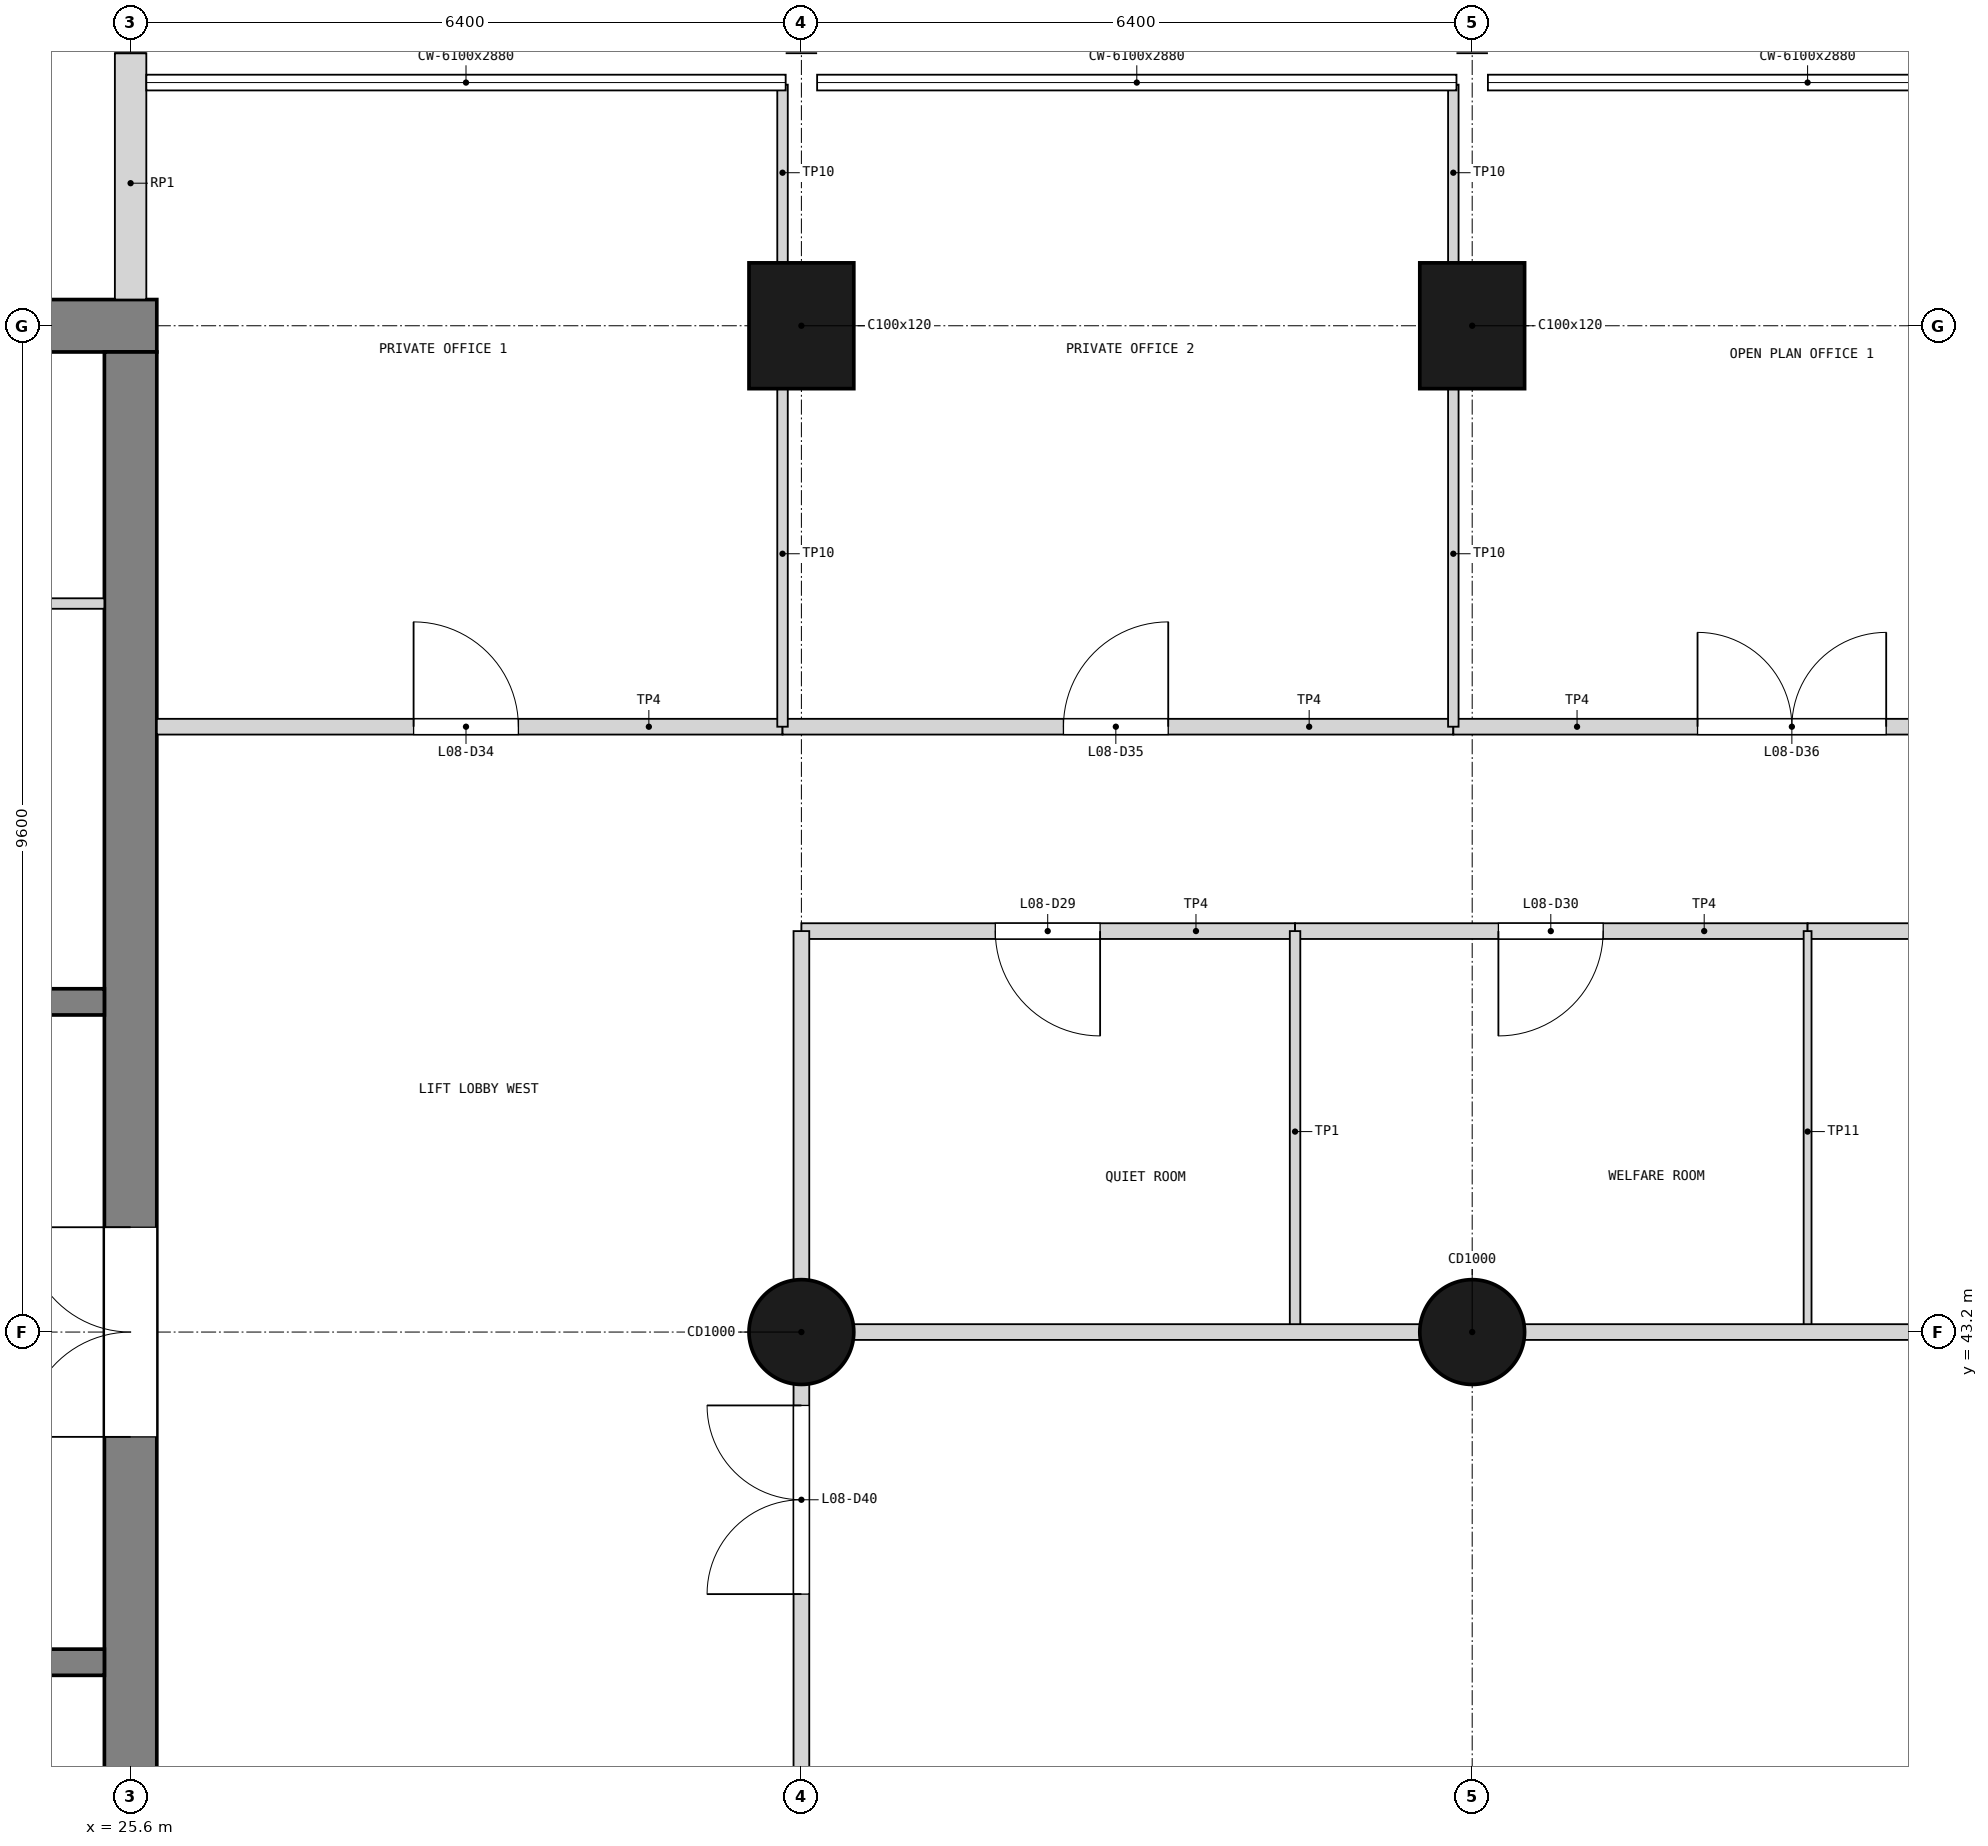
"""IFC4 building model, lengths in metres.
Left out: names, types, materials, properties, quantities, classifications, styles, units other than length and angle.
Written with IfcOpenShell. Run it as: python <this file> out.ifc"""

import sys

from ifc_helpers import new_model, si_unit, direction, frame, frame_2d, origin, origin_2d, place, context, subcontext, project, spatial, rectangle, circle, extrude, element, fill, save


model = new_model("IFC4")
c1 = context("Model", 3, precision=1e-05, world=origin(), true_north=direction((0.0, 1.0)))
c2 = subcontext(c1, "Body", "Model", "MODEL_VIEW")
j1 = project(units=[si_unit("LENGTHUNIT", "METRE"), si_unit("PLANEANGLEUNIT", "RADIAN")], contexts=[c1])
p1 = place(None, origin())
s1 = spatial("IfcSite", under=j1, at=p1, CompositionType="ELEMENT")
p2 = place(p1, origin())
s2 = spatial("IfcBuilding", under=s1, at=p2, CompositionType="ELEMENT")
p3 = place(p2, frame((0.0, 0.0, 32.7)))
s3 = spatial("IfcBuildingStorey", under=s2, at=p3, CompositionType="ELEMENT", Elevation=32.7)
p4 = place(p3, frame((12.55, 52.8, 0.0), z_axis=(0.0, 0.0, 1.0), x_axis=(1.0, 0.0, 0.0)))
e1 = element("IfcWall", 1, at=p4, inside=s3, PredefinedType="SHEAR", context=c2, shape_type="SweptSolid", body=[
    extrude(rectangle(XDim=13.3, YDim=0.5, at=frame_2d((6.65, 0.0))), origin(), (0.0, 0.0, 1.0), 3.9),
])
p5 = place(p4, frame((1.85, 0.0, 1.0)))
e2 = element("IfcOpeningElement", 2, at=p5, cuts=e1, PredefinedType="OPENING", context=c2, shape_type="SweptSolid", body=[
    extrude(rectangle(XDim=0.4, YDim=2.0, at=frame_2d((0.2, 1.0))), frame((0.0, 0.26, 0.0), z_axis=(0.0, -1.0, 0.0), x_axis=(1.0, 0.0, 0.0)), (0.0, 0.0, 1.0), 0.52),
])
p6 = place(p3, frame((25.6, 33.85, 0.0), z_axis=(0.0, 0.0, 1.0), x_axis=(0.0, 1.0, 0.0)))
e3 = element("IfcWall", 3, at=p6, inside=s3, PredefinedType="SHEAR", context=c2, shape_type="SweptSolid", body=[
    extrude(rectangle(XDim=18.7, YDim=0.5, at=frame_2d((9.35, 0.0))), origin(), (0.0, 0.0, 1.0), 3.9),
])
p7 = place(p6, frame((8.35, 0.0, 0.0)))
e4 = element("IfcOpeningElement", 4, at=p7, cuts=e3, PredefinedType="OPENING", context=c2, shape_type="SweptSolid", body=[
    extrude(rectangle(XDim=2.0, YDim=2.1, at=frame_2d((1.0, 1.05))), frame((0.0, 0.26, 0.0), z_axis=(0.0, -1.0, 0.0), x_axis=(1.0, 0.0, 0.0)), (0.0, 0.0, 1.0), 0.52),
])
p8 = place(p3, frame((32.0, 43.2, 0.0), z_axis=(0.0, 0.0, 1.0), x_axis=(1.0, 0.0, 0.0)))
e5 = element("IfcColumn", 5, at=p8, inside=s3, PredefinedType="COLUMN", context=c2, shape_type="SweptSolid", body=[
    extrude(circle(Radius=0.5, at=origin_2d()), origin(), (0.0, 0.0, 1.0), 3.9),
])
p9 = place(p3, frame((32.0, 52.8, 0.0), z_axis=(0.0, 0.0, 1.0), x_axis=(1.0, 0.0, 0.0)))
e6 = element("IfcColumn", 6, at=p9, inside=s3, PredefinedType="COLUMN", context=c2, shape_type="SweptSolid", body=[
    extrude(rectangle(XDim=1.0, YDim=1.2, at=origin_2d()), origin(), (0.0, 0.0, 1.0), 3.9),
])
p10 = place(p3, frame((38.4, 43.2, 0.0), z_axis=(0.0, 0.0, 1.0), x_axis=(1.0, 0.0, 0.0)))
e7 = element("IfcColumn", 7, at=p10, inside=s3, PredefinedType="COLUMN", context=c2, shape_type="SweptSolid", body=[
    extrude(circle(Radius=0.5, at=origin_2d()), origin(), (0.0, 0.0, 1.0), 3.9),
])
p11 = place(p3, frame((38.4, 52.8, 0.0), z_axis=(0.0, 0.0, 1.0), x_axis=(1.0, 0.0, 0.0)))
e8 = element("IfcColumn", 8, at=p11, inside=s3, PredefinedType="COLUMN", context=c2, shape_type="SweptSolid", body=[
    extrude(rectangle(XDim=1.0, YDim=1.2, at=origin_2d()), origin(), (0.0, 0.0, 1.0), 3.9),
])
p12 = place(p3, frame((25.6, 53.05, 0.0), z_axis=(0.0, 0.0, 1.0), x_axis=(0.0, 1.0, 0.0)))
e9 = element("IfcWall", 9, at=p12, inside=s3, PredefinedType="SOLIDWALL", context=c2, shape_type="SweptSolid", body=[
    extrude(rectangle(XDim=2.35, YDim=0.3, at=frame_2d((1.175, 0.0))), origin(), (0.0, 0.0, 1.0), 2.88),
])
for number, where, z_axis, x_axis in (
    (10, (19.875, 40.05, 0.0), (0.0, 0.0, 1.0), (1.0, 0.0, 0.0)),
    (11, (19.875, 46.35, 0.0), (0.0, 0.0, 1.0), (1.0, 0.0, 0.0)),
):
    element("IfcWall", number, at=place(p3, frame(where, z_axis=z_axis, x_axis=x_axis)), inside=s3, PredefinedType="SOLIDWALL", context=c2, shape_type="SweptSolid", body=[
        extrude(rectangle(XDim=5.475, YDim=0.25, at=frame_2d((2.738, 0.0))), origin(), (0.0, 0.0, 1.0), 3.6),
    ])
p13 = place(p3, frame((20.125, 50.15, 0.0), z_axis=(0.0, 0.0, 1.0), x_axis=(1.0, 0.0, 0.0)))
e12 = element("IfcWall", 12, at=p13, inside=s3, PredefinedType="PARTITIONING", context=c2, shape_type="SweptSolid", body=[
    extrude(rectangle(XDim=5.225, YDim=0.1, at=frame_2d((2.613, 0.0))), origin(), (0.0, 0.0, 1.0), 3.6),
])
p14 = place(p3, frame((32.0, 47.025, 0.0), z_axis=(0.0, 0.0, 1.0), x_axis=(1.0, 0.0, 0.0)))
e13 = element("IfcWall", 13, at=p14, inside=s3, PredefinedType="PARTITIONING", context=c2, shape_type="SweptSolid", body=[
    extrude(rectangle(XDim=4.71, YDim=0.15, at=frame_2d((2.355, 0.0))), origin(), (0.0, 0.0, 1.0), 3.68),
])
p15 = place(p14, frame((1.85, 0.0, 0.0)))
e14 = element("IfcOpeningElement", 14, at=p15, cuts=e13, PredefinedType="OPENING", context=c2, shape_type="SweptSolid", body=[
    extrude(rectangle(XDim=1.0, YDim=2.1, at=frame_2d((0.5, 1.05))), frame((0.0, 0.085, 0.0), z_axis=(0.0, -1.0, 0.0), x_axis=(1.0, 0.0, 0.0)), (0.0, 0.0, 1.0), 0.17),
])
p16 = place(p3, frame((36.71, 47.025, 0.0), z_axis=(0.0, 0.0, 1.0), x_axis=(1.0, 0.0, 0.0)))
e15 = element("IfcWall", 15, at=p16, inside=s3, PredefinedType="PARTITIONING", context=c2, shape_type="SweptSolid", body=[
    extrude(rectangle(XDim=4.89, YDim=0.15, at=frame_2d((2.445, 0.0))), origin(), (0.0, 0.0, 1.0), 3.68),
])
p17 = place(p16, frame((1.94, 0.0, 0.0)))
e16 = element("IfcOpeningElement", 16, at=p17, cuts=e15, PredefinedType="OPENING", context=c2, shape_type="SweptSolid", body=[
    extrude(rectangle(XDim=1.0, YDim=2.1, at=frame_2d((0.5, 1.05))), frame((0.0, 0.085, 0.0), z_axis=(0.0, -1.0, 0.0), x_axis=(1.0, 0.0, 0.0)), (0.0, 0.0, 1.0), 0.17),
])
p18 = place(p3, frame((41.6, 47.025, 0.0), z_axis=(0.0, 0.0, 1.0), x_axis=(1.0, 0.0, 0.0)))
e17 = element("IfcWall", 17, at=p18, inside=s3, PredefinedType="PARTITIONING", context=c2, shape_type="SweptSolid", body=[
    extrude(rectangle(XDim=6.4, YDim=0.15, at=frame_2d((3.2, 0.0))), origin(), (0.0, 0.0, 1.0), 3.68),
])
p19 = place(p18, frame((2.7, 0.0, 0.0)))
e18 = element("IfcOpeningElement", 18, at=p19, cuts=e17, PredefinedType="OPENING", context=c2, shape_type="SweptSolid", body=[
    extrude(rectangle(XDim=1.0, YDim=2.1, at=frame_2d((0.5, 1.05))), frame((0.0, 0.085, 0.0), z_axis=(0.0, -1.0, 0.0), x_axis=(1.0, 0.0, 0.0)), (0.0, 0.0, 1.0), 0.17),
])
p20 = place(p3, frame((36.71, 43.2, 0.0), z_axis=(0.0, 0.0, 1.0), x_axis=(0.0, 1.0, 0.0)))
e19 = element("IfcWall", 19, at=p20, inside=s3, PredefinedType="PARTITIONING", context=c2, shape_type="SweptSolid", body=[
    extrude(rectangle(XDim=3.825, YDim=0.1, at=frame_2d((1.913, 0.0))), origin(), (0.0, 0.0, 1.0), 3.68),
])
p21 = place(p3, frame((41.6, 43.2, 0.0), z_axis=(0.0, 0.0, 1.0), x_axis=(0.0, 1.0, 0.0)))
e20 = element("IfcWall", 20, at=p21, inside=s3, PredefinedType="PARTITIONING", context=c2, shape_type="SweptSolid", body=[
    extrude(rectangle(XDim=3.825, YDim=0.075, at=frame_2d((1.913, 0.0))), origin(), (0.0, 0.0, 1.0), 3.08),
])
p22 = place(p3, frame((25.85, 48.975, 0.0), z_axis=(0.0, 0.0, 1.0), x_axis=(1.0, 0.0, 0.0)))
e21 = element("IfcWall", 21, at=p22, inside=s3, PredefinedType="PARTITIONING", context=c2, shape_type="SweptSolid", body=[
    extrude(rectangle(XDim=5.97, YDim=0.15, at=frame_2d((2.985, 0.0))), origin(), (0.0, 0.0, 1.0), 3.68),
])
p23 = place(p22, frame((2.45, 0.0, 0.0)))
e22 = element("IfcOpeningElement", 22, at=p23, cuts=e21, PredefinedType="OPENING", context=c2, shape_type="SweptSolid", body=[
    extrude(rectangle(XDim=1.0, YDim=2.1, at=frame_2d((0.5, 1.05))), frame((0.0, 0.085, 0.0), z_axis=(0.0, -1.0, 0.0), x_axis=(1.0, 0.0, 0.0)), (0.0, 0.0, 1.0), 0.17),
])
p24 = place(p3, frame((31.82, 48.975, 0.0), z_axis=(0.0, 0.0, 1.0), x_axis=(1.0, 0.0, 0.0)))
e23 = element("IfcWall", 23, at=p24, inside=s3, PredefinedType="PARTITIONING", context=c2, shape_type="SweptSolid", body=[
    extrude(rectangle(XDim=6.4, YDim=0.15, at=frame_2d((3.2, 0.0))), origin(), (0.0, 0.0, 1.0), 3.68),
])
p25 = place(p24, frame((2.68, 0.0, 0.0)))
e24 = element("IfcOpeningElement", 24, at=p25, cuts=e23, PredefinedType="OPENING", context=c2, shape_type="SweptSolid", body=[
    extrude(rectangle(XDim=1.0, YDim=2.1, at=frame_2d((0.5, 1.05))), frame((0.0, 0.085, 0.0), z_axis=(0.0, -1.0, 0.0), x_axis=(1.0, 0.0, 0.0)), (0.0, 0.0, 1.0), 0.17),
])
p26 = place(p3, frame((38.22, 48.975, 0.0), z_axis=(0.0, 0.0, 1.0), x_axis=(1.0, 0.0, 0.0)))
e25 = element("IfcWall", 25, at=p26, inside=s3, PredefinedType="PARTITIONING", context=c2, shape_type="SweptSolid", body=[
    extrude(rectangle(XDim=6.4, YDim=0.15, at=frame_2d((3.2, 0.0))), origin(), (0.0, 0.0, 1.0), 3.68),
])
p27 = place(p26, frame((2.33, 0.0, 0.0)))
e26 = element("IfcOpeningElement", 26, at=p27, cuts=e25, PredefinedType="OPENING", context=c2, shape_type="SweptSolid", body=[
    extrude(rectangle(XDim=1.8, YDim=2.1, at=frame_2d((0.9, 1.05))), frame((0.0, 0.085, 0.0), z_axis=(0.0, -1.0, 0.0), x_axis=(1.0, 0.0, 0.0)), (0.0, 0.0, 1.0), 0.17),
])
p28 = place(p3, frame((31.82, 48.975, 0.0), z_axis=(0.0, 0.0, 1.0), x_axis=(0.0, 1.0, 0.0)))
e27 = element("IfcWall", 27, at=p28, inside=s3, PredefinedType="PARTITIONING", context=c2, shape_type="SweptSolid", body=[
    extrude(rectangle(XDim=3.245, YDim=0.1, at=frame_2d((1.623, 0.0))), origin(), (0.0, 0.0, 1.0), 2.78),
])
p29 = place(p3, frame((31.82, 53.38, 0.0), z_axis=(0.0, 0.0, 1.0), x_axis=(0.0, 1.0, 0.0)))
e28 = element("IfcWall", 28, at=p29, inside=s3, PredefinedType="PARTITIONING", context=c2, shape_type="SweptSolid", body=[
    extrude(rectangle(XDim=1.72, YDim=0.1, at=frame_2d((0.86, 0.0))), origin(), (0.0, 0.0, 1.0), 2.78),
])
p30 = place(p3, frame((38.22, 48.975, 0.0), z_axis=(0.0, 0.0, 1.0), x_axis=(0.0, 1.0, 0.0)))
e29 = element("IfcWall", 29, at=p30, inside=s3, PredefinedType="PARTITIONING", context=c2, shape_type="SweptSolid", body=[
    extrude(rectangle(XDim=3.245, YDim=0.1, at=frame_2d((1.623, 0.0))), origin(), (0.0, 0.0, 1.0), 2.78),
])
p31 = place(p3, frame((38.22, 53.38, 0.0), z_axis=(0.0, 0.0, 1.0), x_axis=(0.0, 1.0, 0.0)))
e30 = element("IfcWall", 30, at=p31, inside=s3, PredefinedType="PARTITIONING", context=c2, shape_type="SweptSolid", body=[
    extrude(rectangle(XDim=1.72, YDim=0.1, at=frame_2d((0.86, 0.0))), origin(), (0.0, 0.0, 1.0), 2.78),
])
p32 = place(p3, frame((32.0, 33.6, 0.0), z_axis=(0.0, 0.0, 1.0), x_axis=(0.0, 1.0, 0.0)))
e31 = element("IfcWall", 31, at=p32, inside=s3, PredefinedType="PARTITIONING", context=c2, shape_type="SweptSolid", body=[
    extrude(rectangle(XDim=13.425, YDim=0.15, at=frame_2d((6.712, 0.0))), origin(), (0.0, 0.0, 1.0), 2.78),
])
p33 = place(p32, frame((7.1, 0.0, 0.0)))
e32 = element("IfcOpeningElement", 32, at=p33, cuts=e31, PredefinedType="OPENING", context=c2, shape_type="SweptSolid", body=[
    extrude(rectangle(XDim=1.8, YDim=2.1, at=frame_2d((0.9, 1.05))), frame((0.0, 0.085, 0.0), z_axis=(0.0, -1.0, 0.0), x_axis=(1.0, 0.0, 0.0)), (0.0, 0.0, 1.0), 0.17),
])
p34 = place(p3, frame((32.0, 43.2, 0.0), z_axis=(0.0, 0.0, 1.0), x_axis=(1.0, 0.0, 0.0)))
e33 = element("IfcWall", 33, at=p34, inside=s3, PredefinedType="PARTITIONING", context=c2, shape_type="SweptSolid", body=[
    extrude(rectangle(XDim=25.6, YDim=0.15, at=frame_2d((12.8, 0.0))), origin(), (0.0, 0.0, 1.0), 2.88),
])
p35 = place(p7, origin())
e34 = element("IfcDoor", 34, at=p35, inside=s3, OperationType="DOUBLE_DOOR_SINGLE_SWING", PredefinedType="DOOR", context=c2, shape_type="SweptSolid", body=[
    extrude(rectangle(XDim=2.0, YDim=2.1, at=frame_2d((1.0, 1.05))), frame((0.0, 0.025, 0.0), z_axis=(0.0, -1.0, 0.0), x_axis=(1.0, 0.0, 0.0)), (0.0, 0.0, 1.0), 0.05),
])
fill(e4, e34)
p36 = place(p15, frame((1.0, 0.0, 0.0), z_axis=(0.0, 0.0, 1.0), x_axis=(-1.0, 0.0, 0.0)))
e35 = element("IfcDoor", 35, at=p36, inside=s3, OperationType="SINGLE_SWING_LEFT", PredefinedType="DOOR", context=c2, shape_type="SweptSolid", body=[
    extrude(rectangle(XDim=1.0, YDim=2.1, at=frame_2d((0.5, 1.05))), frame((0.0, 0.025, 0.0), z_axis=(0.0, -1.0, 0.0), x_axis=(1.0, 0.0, 0.0)), (0.0, 0.0, 1.0), 0.05),
])
fill(e14, e35)
p37 = place(p17, frame((1.0, 0.0, 0.0), z_axis=(0.0, 0.0, 1.0), x_axis=(-1.0, 0.0, 0.0)))
e36 = element("IfcDoor", 36, at=p37, inside=s3, OperationType="SINGLE_SWING_RIGHT", PredefinedType="DOOR", context=c2, shape_type="SweptSolid", body=[
    extrude(rectangle(XDim=1.0, YDim=2.1, at=frame_2d((0.5, 1.05))), frame((0.0, 0.025, 0.0), z_axis=(0.0, -1.0, 0.0), x_axis=(1.0, 0.0, 0.0)), (0.0, 0.0, 1.0), 0.05),
])
fill(e16, e36)
p38 = place(p23, origin())
e37 = element("IfcDoor", 37, at=p38, inside=s3, OperationType="SINGLE_SWING_LEFT", PredefinedType="DOOR", context=c2, shape_type="SweptSolid", body=[
    extrude(rectangle(XDim=1.0, YDim=2.1, at=frame_2d((0.5, 1.05))), frame((0.0, 0.025, 0.0), z_axis=(0.0, -1.0, 0.0), x_axis=(1.0, 0.0, 0.0)), (0.0, 0.0, 1.0), 0.05),
])
fill(e22, e37)
p39 = place(p25, origin())
e38 = element("IfcDoor", 38, at=p39, inside=s3, OperationType="SINGLE_SWING_RIGHT", PredefinedType="DOOR", context=c2, shape_type="SweptSolid", body=[
    extrude(rectangle(XDim=1.0, YDim=2.1, at=frame_2d((0.5, 1.05))), frame((0.0, 0.025, 0.0), z_axis=(0.0, -1.0, 0.0), x_axis=(1.0, 0.0, 0.0)), (0.0, 0.0, 1.0), 0.05),
])
fill(e24, e38)
p40 = place(p27, origin())
e39 = element("IfcDoor", 39, at=p40, inside=s3, OperationType="DOUBLE_DOOR_SINGLE_SWING", PredefinedType="DOOR", context=c2, shape_type="SweptSolid", body=[
    extrude(rectangle(XDim=1.8, YDim=2.1, at=frame_2d((0.9, 1.05))), frame((0.0, 0.025, 0.0), z_axis=(0.0, -1.0, 0.0), x_axis=(1.0, 0.0, 0.0)), (0.0, 0.0, 1.0), 0.05),
])
fill(e26, e39)
p41 = place(p33, origin())
e40 = element("IfcDoor", 40, at=p41, inside=s3, OperationType="DOUBLE_DOOR_SINGLE_SWING", PredefinedType="DOOR", context=c2, shape_type="SweptSolid", body=[
    extrude(rectangle(XDim=1.8, YDim=2.1, at=frame_2d((0.9, 1.05))), frame((0.0, 0.025, 0.0), z_axis=(0.0, -1.0, 0.0), x_axis=(1.0, 0.0, 0.0)), (0.0, 0.0, 1.0), 0.05),
])
fill(e32, e40)
save(model, sys.argv[1])
